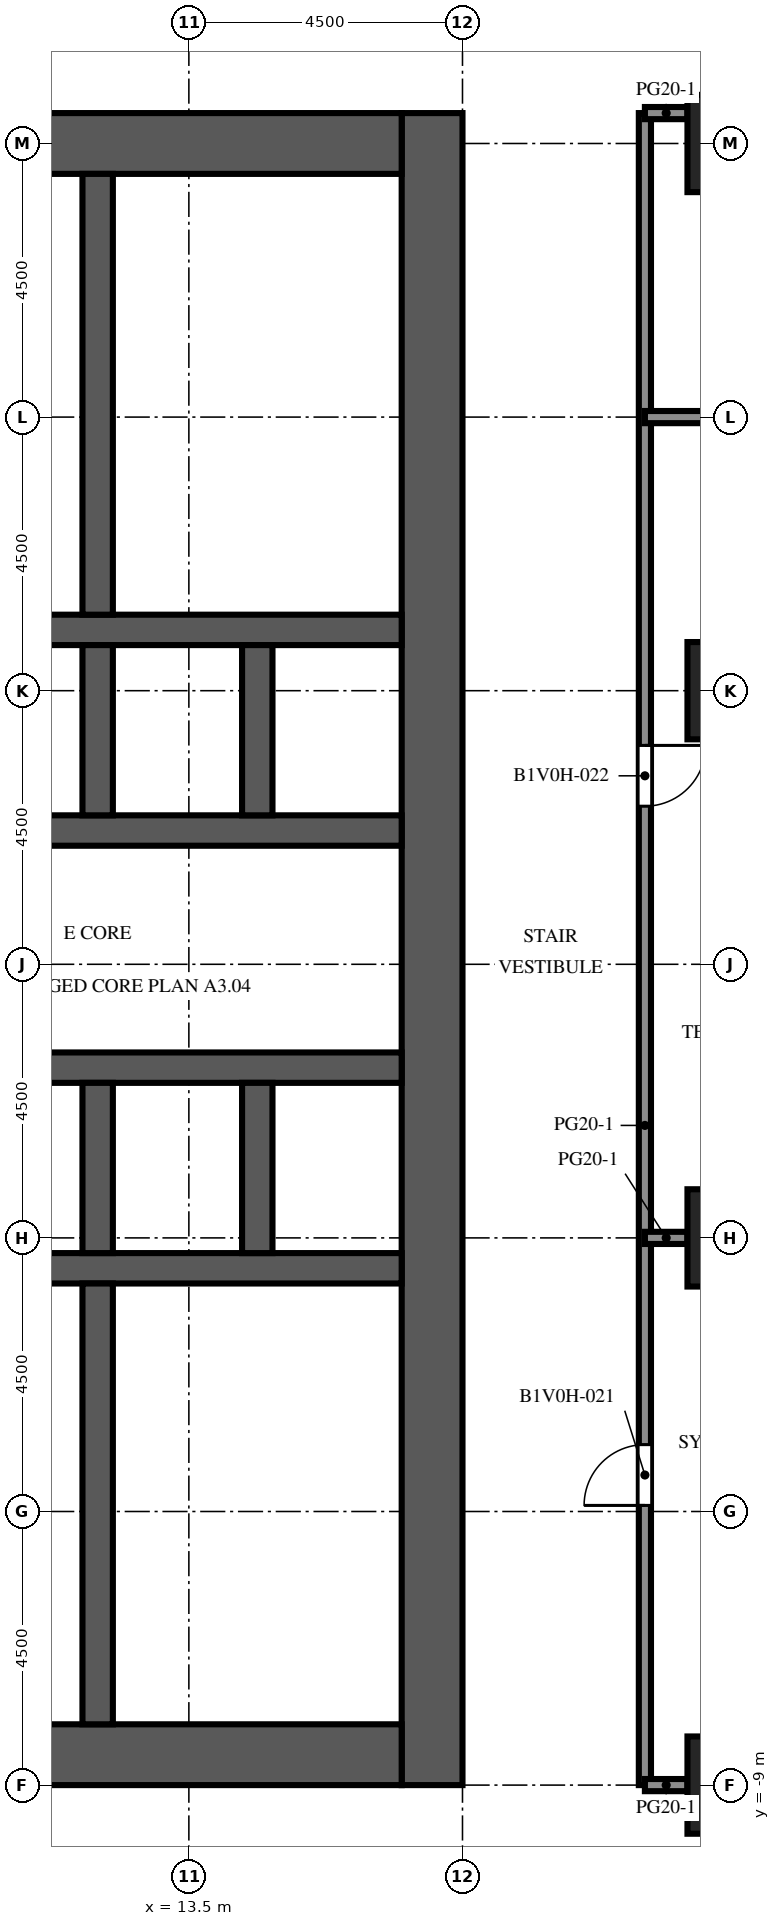
"""IFC4 building model, lengths in metres.
Left out: names, types, materials, properties, quantities, classifications, styles, units other than length and angle.
Written with IfcOpenShell. Run it as: python <this file> out.ifc"""

import sys

from ifc_helpers import new_model, si_unit, direction, frame, frame_2d, origin, origin_2d, place, context, subcontext, project, spatial, rectangle, extrude, element, fill, save


model = new_model("IFC4")
c1 = context("Model", 3, precision=1e-05, world=origin(), true_north=direction((0.0, 1.0)))
c2 = subcontext(c1, "Body", "Model", "MODEL_VIEW")
j1 = project(units=[si_unit("LENGTHUNIT", "METRE"), si_unit("PLANEANGLEUNIT", "RADIAN")], contexts=[c1])
p1 = place(None, origin())
s1 = spatial("IfcSite", under=j1, at=p1, CompositionType="ELEMENT")
p2 = place(p1, origin())
s2 = spatial("IfcBuilding", under=s1, at=p2, CompositionType="ELEMENT")
p3 = place(p2, frame((0.0, 0.0, 7.2)))
s3 = spatial("IfcBuildingStorey", under=s2, at=p3, CompositionType="ELEMENT", Elevation=7.2)
for number, where, z_axis, x_axis in (
    (1, (22.5, -9.0, 0.0), (0.0, 0.0, 1.0), (1.0, 0.0, 0.0)),
    (2, (22.5, 0.0, 0.0), (0.0, 0.0, 1.0), (1.0, 0.0, 0.0)),
    (3, (22.5, 9.0, 0.0), (0.0, 0.0, 1.0), (1.0, 0.0, 0.0)),
    (4, (22.5, 18.0, 0.0), (0.0, 0.0, 1.0), (1.0, 0.0, 0.0)),
):
    element("IfcColumn", number, at=place(p3, frame(where, z_axis=z_axis, x_axis=x_axis)), inside=s3, PredefinedType="COLUMN", context=c2, shape_type="SweptSolid", body=[
        extrude(rectangle(XDim=1.6, YDim=1.6, at=origin_2d()), origin(), (0.0, 0.0, 1.0), 4.1),
    ])
p4 = place(p3, frame((17.5, -9.0, 0.0), z_axis=(0.0, 0.0, 1.0), x_axis=(0.0, 1.0, 0.0)))
e5 = element("IfcWall", 5, at=p4, inside=s3, PredefinedType="SHEAR", context=c2, shape_type="SweptSolid", body=[
    extrude(rectangle(XDim=27.5, YDim=1.0, at=frame_2d((13.75, 0.0))), origin(), (0.0, 0.0, 1.0), 4.1),
])
p5 = place(p4, frame((12.55, 0.0, 0.0)))
e6 = element("IfcOpeningElement", 6, at=p5, cuts=e5, PredefinedType="OPENING", context=c2, shape_type="SweptSolid", body=[
    extrude(rectangle(XDim=2.4, YDim=2.4, at=frame_2d((1.2, 1.2))), frame((0.0, 0.51, 0.0), z_axis=(0.0, -1.0, 0.0), x_axis=(1.0, 0.0, 0.0)), (0.0, 0.0, 1.0), 1.02),
])
p6 = place(p4, frame((6.825, 0.0, 0.0)))
e7 = element("IfcOpeningElement", 7, at=p6, cuts=e5, PredefinedType="OPENING", context=c2, shape_type="SweptSolid", body=[
    extrude(rectangle(XDim=1.2, YDim=2.1, at=frame_2d((0.6, 1.05))), frame((0.0, 0.51, 0.0), z_axis=(0.0, -1.0, 0.0), x_axis=(1.0, 0.0, 0.0)), (0.0, 0.0, 1.0), 1.02),
])
p7 = place(p4, frame((19.475, 0.0, 0.0)))
e8 = element("IfcOpeningElement", 8, at=p7, cuts=e5, PredefinedType="OPENING", context=c2, shape_type="SweptSolid", body=[
    extrude(rectangle(XDim=1.2, YDim=2.1, at=frame_2d((0.6, 1.05))), frame((0.0, 0.51, 0.0), z_axis=(0.0, -1.0, 0.0), x_axis=(1.0, 0.0, 0.0)), (0.0, 0.0, 1.0), 1.02),
])
for number, where, z_axis, x_axis in (
    (9, (7.0, -8.5, 0.0), (0.0, 0.0, 1.0), (1.0, 0.0, 0.0)),
    (10, (7.0, 18.0, 0.0), (0.0, 0.0, 1.0), (1.0, 0.0, 0.0)),
):
    element("IfcWall", number, at=place(p3, frame(where, z_axis=z_axis, x_axis=x_axis)), inside=s3, PredefinedType="SHEAR", context=c2, shape_type="SweptSolid", body=[
        extrude(rectangle(XDim=10.0, YDim=1.0, at=frame_2d((5.0, 0.0))), origin(), (0.0, 0.0, 1.0), 4.1),
    ])
p8 = place(p3, frame((7.0, -0.5, 0.0), z_axis=(0.0, 0.0, 1.0), x_axis=(1.0, 0.0, 0.0)))
e11 = element("IfcWall", 11, at=p8, inside=s3, PredefinedType="SHEAR", context=c2, shape_type="SweptSolid", body=[
    extrude(rectangle(XDim=10.0, YDim=0.5, at=frame_2d((5.0, 0.0))), origin(), (0.0, 0.0, 1.0), 4.1),
])
p9 = place(p3, frame((7.0, 2.8, 0.0), z_axis=(0.0, 0.0, 1.0), x_axis=(1.0, 0.0, 0.0)))
e12 = element("IfcWall", 12, at=p9, inside=s3, PredefinedType="SHEAR", context=c2, shape_type="SweptSolid", body=[
    extrude(rectangle(XDim=10.0, YDim=0.5, at=frame_2d((5.0, 0.0))), origin(), (0.0, 0.0, 1.0), 4.1),
])
p10 = place(p9, frame((0.512, 0.0, 0.0)))
e13 = element("IfcOpeningElement", 13, at=p10, cuts=e12, PredefinedType="OPENING", context=c2, shape_type="SweptSolid", body=[
    extrude(rectangle(XDim=1.1, YDim=2.1, at=frame_2d((0.55, 1.05))), frame((0.0, 0.26, 0.0), z_axis=(0.0, -1.0, 0.0), x_axis=(1.0, 0.0, 0.0)), (0.0, 0.0, 1.0), 0.52),
])
p11 = place(p9, frame((3.137, 0.0, 0.0)))
e14 = element("IfcOpeningElement", 14, at=p11, cuts=e12, PredefinedType="OPENING", context=c2, shape_type="SweptSolid", body=[
    extrude(rectangle(XDim=1.1, YDim=2.1, at=frame_2d((0.55, 1.05))), frame((0.0, 0.26, 0.0), z_axis=(0.0, -1.0, 0.0), x_axis=(1.0, 0.0, 0.0)), (0.0, 0.0, 1.0), 0.52),
])
p12 = place(p9, frame((8.387, 0.0, 0.0)))
e15 = element("IfcOpeningElement", 15, at=p12, cuts=e12, PredefinedType="OPENING", context=c2, shape_type="SweptSolid", body=[
    extrude(rectangle(XDim=1.1, YDim=2.1, at=frame_2d((0.55, 1.05))), frame((0.0, 0.26, 0.0), z_axis=(0.0, -1.0, 0.0), x_axis=(1.0, 0.0, 0.0)), (0.0, 0.0, 1.0), 0.52),
])
p13 = place(p3, frame((7.0, 6.7, 0.0), z_axis=(0.0, 0.0, 1.0), x_axis=(1.0, 0.0, 0.0)))
e16 = element("IfcWall", 16, at=p13, inside=s3, PredefinedType="SHEAR", context=c2, shape_type="SweptSolid", body=[
    extrude(rectangle(XDim=10.0, YDim=0.5, at=frame_2d((5.0, 0.0))), origin(), (0.0, 0.0, 1.0), 4.1),
])
p14 = place(p13, frame((0.512, 0.0, 0.0)))
e17 = element("IfcOpeningElement", 17, at=p14, cuts=e16, PredefinedType="OPENING", context=c2, shape_type="SweptSolid", body=[
    extrude(rectangle(XDim=1.1, YDim=2.1, at=frame_2d((0.55, 1.05))), frame((0.0, 0.26, 0.0), z_axis=(0.0, -1.0, 0.0), x_axis=(1.0, 0.0, 0.0)), (0.0, 0.0, 1.0), 0.52),
])
p15 = place(p13, frame((3.188, 0.0, 0.0)))
e18 = element("IfcOpeningElement", 18, at=p15, cuts=e16, PredefinedType="OPENING", context=c2, shape_type="SweptSolid", body=[
    extrude(rectangle(XDim=1.0, YDim=2.1, at=frame_2d((0.5, 1.05))), frame((0.0, 0.26, 0.0), z_axis=(0.0, -1.0, 0.0), x_axis=(1.0, 0.0, 0.0)), (0.0, 0.0, 1.0), 0.52),
])
p16 = place(p13, frame((5.812, 0.0, 0.0)))
e19 = element("IfcOpeningElement", 19, at=p16, cuts=e16, PredefinedType="OPENING", context=c2, shape_type="SweptSolid", body=[
    extrude(rectangle(XDim=1.0, YDim=2.1, at=frame_2d((0.5, 1.05))), frame((0.0, 0.26, 0.0), z_axis=(0.0, -1.0, 0.0), x_axis=(1.0, 0.0, 0.0)), (0.0, 0.0, 1.0), 0.52),
])
p17 = place(p13, frame((8.438, 0.0, 0.0)))
e20 = element("IfcOpeningElement", 20, at=p17, cuts=e16, PredefinedType="OPENING", context=c2, shape_type="SweptSolid", body=[
    extrude(rectangle(XDim=1.0, YDim=2.1, at=frame_2d((0.5, 1.05))), frame((0.0, 0.26, 0.0), z_axis=(0.0, -1.0, 0.0), x_axis=(1.0, 0.0, 0.0)), (0.0, 0.0, 1.0), 0.52),
])
p18 = place(p3, frame((7.0, 10.0, 0.0), z_axis=(0.0, 0.0, 1.0), x_axis=(1.0, 0.0, 0.0)))
e21 = element("IfcWall", 21, at=p18, inside=s3, PredefinedType="SHEAR", context=c2, shape_type="SweptSolid", body=[
    extrude(rectangle(XDim=10.0, YDim=0.5, at=frame_2d((5.0, 0.0))), origin(), (0.0, 0.0, 1.0), 4.1),
])
for number, where, z_axis, x_axis in (
    (22, (12.0, -0.25, 0.0), (0.0, 0.0, 1.0), (0.0, 1.0, 0.0)),
    (23, (12.0, 6.95, 0.0), (0.0, 0.0, 1.0), (0.0, 1.0, 0.0)),
    (24, (14.625, -0.25, 0.0), (0.0, 0.0, 1.0), (0.0, 1.0, 0.0)),
    (25, (14.625, 6.95, 0.0), (0.0, 0.0, 1.0), (0.0, 1.0, 0.0)),
):
    element("IfcWall", number, at=place(p3, frame(where, z_axis=z_axis, x_axis=x_axis)), inside=s3, PredefinedType="SHEAR", context=c2, shape_type="SweptSolid", body=[
        extrude(rectangle(XDim=2.8, YDim=0.5, at=frame_2d((1.4, 0.0))), origin(), (0.0, 0.0, 1.0), 4.1),
    ])
for number, where, z_axis, x_axis in (
    (26, (12.0, -8.0, 0.0), (0.0, 0.0, 1.0), (0.0, 1.0, 0.0)),
    (27, (12.0, 10.25, 0.0), (0.0, 0.0, 1.0), (0.0, 1.0, 0.0)),
):
    element("IfcWall", number, at=place(p3, frame(where, z_axis=z_axis, x_axis=x_axis)), inside=s3, PredefinedType="SHEAR", context=c2, shape_type="SweptSolid", body=[
        extrude(rectangle(XDim=7.25, YDim=0.5, at=frame_2d((3.625, 0.0))), origin(), (0.0, 0.0, 1.0), 4.1),
    ])
for number, where, z_axis, x_axis in (
    (28, (8.5, -5.535, 0.0), (0.0, 0.0, 1.0), (1.0, 0.0, 0.0)),
    (29, (8.5, -3.505, 0.0), (0.0, 0.0, 1.0), (1.0, 0.0, 0.0)),
):
    element("IfcWall", number, at=place(p3, frame(where, z_axis=z_axis, x_axis=x_axis)), inside=s3, PredefinedType="PARTITIONING", context=c2, shape_type="SweptSolid", body=[
        extrude(rectangle(XDim=3.25, YDim=0.1, at=frame_2d((1.625, 0.0))), origin(), (0.0, 0.0, 1.0), 3.65),
    ])
for number, where, z_axis, x_axis in (
    (30, (8.4, 12.425, 0.0), (0.0, 0.0, 1.0), (1.0, 0.0, 0.0)),
    (31, (8.4, 14.745, 0.0), (0.0, 0.0, 1.0), (1.0, 0.0, 0.0)),
):
    element("IfcWall", number, at=place(p3, frame(where, z_axis=z_axis, x_axis=x_axis)), inside=s3, PredefinedType="PARTITIONING", context=c2, shape_type="SweptSolid", body=[
        extrude(rectangle(XDim=3.35, YDim=0.1, at=frame_2d((1.675, 0.0))), origin(), (0.0, 0.0, 1.0), 3.65),
    ])
p19 = place(p3, frame((21.0, 18.5, 0.0), z_axis=(0.0, 0.0, 1.0), x_axis=(0.0, -1.0, 0.0)))
e32 = element("IfcWall", 32, at=p19, inside=s3, PredefinedType="PARTITIONING", context=c2, shape_type="SweptSolid", body=[
    extrude(rectangle(XDim=27.5, YDim=0.2, at=frame_2d((13.75, 0.0))), origin(), (0.0, 0.0, 1.0), 3.65),
])
p20 = place(p19, frame((21.9, 0.0, 0.0)))
e33 = element("IfcOpeningElement", 33, at=p20, cuts=e32, PredefinedType="OPENING", context=c2, shape_type="SweptSolid", body=[
    extrude(rectangle(XDim=1.0, YDim=2.1, at=frame_2d((0.5, 1.05))), frame((0.0, 0.11, 0.0), z_axis=(0.0, -1.0, 0.0), x_axis=(1.0, 0.0, 0.0)), (0.0, 0.0, 1.0), 0.22),
])
p21 = place(p19, frame((10.4, 0.0, 0.0)))
e34 = element("IfcOpeningElement", 34, at=p21, cuts=e32, PredefinedType="OPENING", context=c2, shape_type="SweptSolid", body=[
    extrude(rectangle(XDim=1.0, YDim=2.1, at=frame_2d((0.5, 1.05))), frame((0.0, 0.11, 0.0), z_axis=(0.0, -1.0, 0.0), x_axis=(1.0, 0.0, 0.0)), (0.0, 0.0, 1.0), 0.22),
])
for number, where, z_axis, x_axis in (
    (35, (21.0, -9.0, 0.0), (0.0, 0.0, 1.0), (1.0, 0.0, 0.0)),
    (36, (21.0, 0.0, 0.0), (0.0, 0.0, 1.0), (1.0, 0.0, 0.0)),
):
    element("IfcWall", number, at=place(p3, frame(where, z_axis=z_axis, x_axis=x_axis)), inside=s3, PredefinedType="PARTITIONING", context=c2, shape_type="SweptSolid", body=[
        extrude(rectangle(XDim=0.7, YDim=0.2, at=frame_2d((0.35, 0.0))), origin(), (0.0, 0.0, 1.0), 3.65),
    ])
p22 = place(p3, frame((21.0, 13.5, 0.0), z_axis=(0.0, 0.0, 1.0), x_axis=(1.0, 0.0, 0.0)))
e37 = element("IfcWall", 37, at=p22, inside=s3, PredefinedType="PARTITIONING", context=c2, shape_type="SweptSolid", body=[
    extrude(rectangle(XDim=5.3, YDim=0.2, at=frame_2d((2.65, 0.0))), origin(), (0.0, 0.0, 1.0), 3.65),
])
p23 = place(p3, frame((21.0, 18.5, 0.0), z_axis=(0.0, 0.0, 1.0), x_axis=(1.0, 0.0, 0.0)))
e38 = element("IfcWall", 38, at=p23, inside=s3, PredefinedType="PARTITIONING", context=c2, shape_type="SweptSolid", body=[
    extrude(rectangle(XDim=0.7, YDim=0.2, at=frame_2d((0.35, 0.0))), origin(), (0.0, 0.0, 1.0), 3.65),
])
p24 = place(p12, origin())
e39 = element("IfcDoor", 39, at=p24, inside=s3, OperationType="DOUBLE_DOOR_SLIDING", PredefinedType="DOOR", context=c2, shape_type="SweptSolid", body=[
    extrude(rectangle(XDim=1.1, YDim=2.1, at=frame_2d((0.55, 1.05))), frame((0.0, 0.025, 0.0), z_axis=(0.0, -1.0, 0.0), x_axis=(1.0, 0.0, 0.0)), (0.0, 0.0, 1.0), 0.05),
])
fill(e15, e39)
p25 = place(p5, origin())
e40 = element("IfcDoor", 40, at=p25, inside=s3, OperationType="DOUBLE_DOOR_DOUBLE_SWING", PredefinedType="DOOR", context=c2, shape_type="SweptSolid", body=[
    extrude(rectangle(XDim=2.4, YDim=2.4, at=frame_2d((1.2, 1.2))), frame((0.0, 0.025, 0.0), z_axis=(0.0, -1.0, 0.0), x_axis=(1.0, 0.0, 0.0)), (0.0, 0.0, 1.0), 0.05),
])
fill(e6, e40)
p26 = place(p6, frame((1.2, 0.0, 0.0), z_axis=(0.0, 0.0, 1.0), x_axis=(-1.0, 0.0, 0.0)))
e41 = element("IfcDoor", 41, at=p26, inside=s3, OperationType="SINGLE_SWING_LEFT", PredefinedType="DOOR", context=c2, shape_type="SweptSolid", body=[
    extrude(rectangle(XDim=1.2, YDim=2.1, at=frame_2d((0.6, 1.05))), frame((0.0, 0.025, 0.0), z_axis=(0.0, -1.0, 0.0), x_axis=(1.0, 0.0, 0.0)), (0.0, 0.0, 1.0), 0.05),
])
fill(e7, e41)
p27 = place(p7, frame((1.2, 0.0, 0.0), z_axis=(0.0, 0.0, 1.0), x_axis=(-1.0, 0.0, 0.0)))
e42 = element("IfcDoor", 42, at=p27, inside=s3, OperationType="SINGLE_SWING_LEFT", PredefinedType="DOOR", context=c2, shape_type="SweptSolid", body=[
    extrude(rectangle(XDim=1.2, YDim=2.1, at=frame_2d((0.6, 1.05))), frame((0.0, 0.025, 0.0), z_axis=(0.0, -1.0, 0.0), x_axis=(1.0, 0.0, 0.0)), (0.0, 0.0, 1.0), 0.05),
])
fill(e8, e42)
p28 = place(p16, origin())
e43 = element("IfcDoor", 43, at=p28, inside=s3, OperationType="SINGLE_SWING_LEFT", PredefinedType="DOOR", context=c2, shape_type="SweptSolid", body=[
    extrude(rectangle(XDim=1.0, YDim=2.1, at=frame_2d((0.5, 1.05))), frame((0.0, 0.025, 0.0), z_axis=(0.0, -1.0, 0.0), x_axis=(1.0, 0.0, 0.0)), (0.0, 0.0, 1.0), 0.05),
])
fill(e19, e43)
p29 = place(p17, origin())
e44 = element("IfcDoor", 44, at=p29, inside=s3, OperationType="SINGLE_SWING_RIGHT", PredefinedType="DOOR", context=c2, shape_type="SweptSolid", body=[
    extrude(rectangle(XDim=1.0, YDim=2.1, at=frame_2d((0.5, 1.05))), frame((0.0, 0.025, 0.0), z_axis=(0.0, -1.0, 0.0), x_axis=(1.0, 0.0, 0.0)), (0.0, 0.0, 1.0), 0.05),
])
fill(e20, e44)
p30 = place(p20, origin())
e45 = element("IfcDoor", 45, at=p30, inside=s3, OperationType="SINGLE_SWING_RIGHT", PredefinedType="DOOR", context=c2, shape_type="SweptSolid", body=[
    extrude(rectangle(XDim=1.0, YDim=2.1, at=frame_2d((0.5, 1.05))), frame((0.0, 0.025, 0.0), z_axis=(0.0, -1.0, 0.0), x_axis=(1.0, 0.0, 0.0)), (0.0, 0.0, 1.0), 0.05),
])
fill(e33, e45)
p31 = place(p21, origin())
e46 = element("IfcDoor", 46, at=p31, inside=s3, OperationType="SINGLE_SWING_LEFT", PredefinedType="DOOR", context=c2, shape_type="SweptSolid", body=[
    extrude(rectangle(XDim=1.0, YDim=2.1, at=frame_2d((0.5, 1.05))), frame((0.0, 0.025, 0.0), z_axis=(0.0, -1.0, 0.0), x_axis=(1.0, 0.0, 0.0)), (0.0, 0.0, 1.0), 0.05),
])
fill(e34, e46)
save(model, sys.argv[1])
